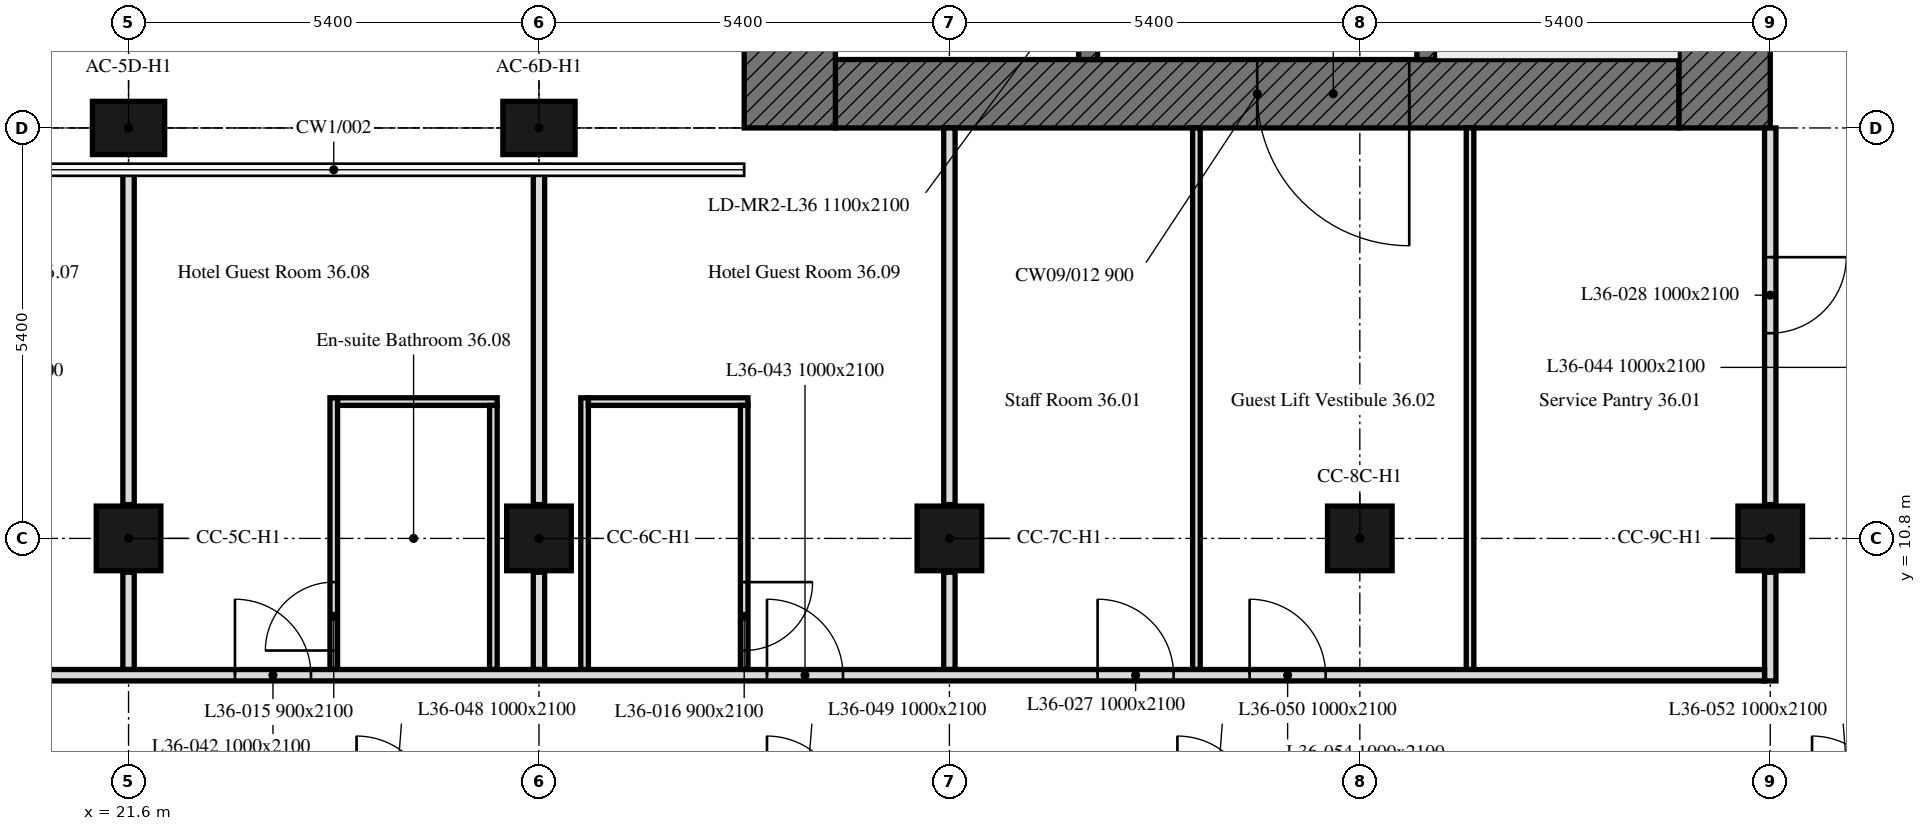
"""IFC4 building model, lengths in metres.
Left out: names, types, materials, properties, quantities, classifications, styles, units other than length and angle.
Written with IfcOpenShell. Run it as: python <this file> out.ifc"""

import sys

from ifc_helpers import new_model, si_unit, direction, frame, frame_2d, origin, origin_2d, place, context, subcontext, project, spatial, rectangle, extrude, element, fill, save


model = new_model("IFC4")
c1 = context("Model", 3, precision=1e-05, world=origin(), true_north=direction((0.0, 1.0)))
c2 = subcontext(c1, "Body", "Model", "MODEL_VIEW")
j1 = project(units=[si_unit("LENGTHUNIT", "METRE"), si_unit("PLANEANGLEUNIT", "RADIAN")], contexts=[c1])
p1 = place(None, origin())
s1 = spatial("IfcSite", under=j1, at=p1, CompositionType="ELEMENT")
p2 = place(p1, origin())
s2 = spatial("IfcBuilding", under=s1, at=p2, CompositionType="ELEMENT")
p3 = place(p2, frame((0.0, 0.0, 156.1)))
s3 = spatial("IfcBuildingStorey", under=s2, at=p3, CompositionType="ELEMENT", Elevation=156.1)
for number, where, z_axis, x_axis in (
    (1, (21.6, 10.8, 0.0), (0.0, 0.0, 1.0), (1.0, 0.0, 0.0)),
    (2, (27.0, 10.8, 0.0), (0.0, 0.0, 1.0), (1.0, 0.0, 0.0)),
    (3, (32.4, 10.8, 0.0), (0.0, 0.0, 1.0), (1.0, 0.0, 0.0)),
    (4, (37.8, 10.8, 0.0), (0.0, 0.0, 1.0), (1.0, 0.0, 0.0)),
    (5, (43.2, 10.8, 0.0), (0.0, 0.0, 1.0), (1.0, 0.0, 0.0)),
):
    element("IfcColumn", number, at=place(p3, frame(where, z_axis=z_axis, x_axis=x_axis)), inside=s3, PredefinedType="COLUMN", context=c2, shape_type="SweptSolid", body=[
        extrude(rectangle(XDim=0.85, YDim=0.85, at=origin_2d()), origin(), (0.0, 0.0, 1.0), 3.0),
    ])
for number, where, z_axis, x_axis in (
    (6, (21.6, 16.2, 0.0), (0.0, 0.0, 1.0), (1.0, 0.0, 0.0)),
    (7, (27.0, 16.2, 0.0), (0.0, 0.0, 1.0), (1.0, 0.0, 0.0)),
):
    element("IfcColumn", number, at=place(p3, frame(where, z_axis=z_axis, x_axis=x_axis)), inside=s3, PredefinedType="COLUMN", context=c2, shape_type="SweptSolid", body=[
        extrude(rectangle(XDim=0.95, YDim=0.7, at=origin_2d()), origin(), (0.0, 0.0, 1.0), 3.0),
    ])
p4 = place(p3, frame((42.0, 16.65, 0.0), z_axis=(0.0, 0.0, 1.0), x_axis=(-1.0, 0.0, 0.0)))
e8 = element("IfcWall", 8, at=p4, inside=s3, PredefinedType="SOLIDWALL", context=c2, shape_type="SweptSolid", body=[
    extrude(rectangle(XDim=11.1, YDim=0.9, at=frame_2d((5.55, 0.0))), origin(), (0.0, 0.0, 1.0), 3.0),
])
p5 = place(p4, frame((3.55, 0.0, 0.0)))
e9 = element("IfcOpeningElement", 9, at=p5, cuts=e8, PredefinedType="OPENING", context=c2, shape_type="SweptSolid", body=[
    extrude(rectangle(XDim=2.0, YDim=2.4, at=frame_2d((1.0, 1.2))), frame((0.0, 0.45, 0.0), z_axis=(0.0, -1.0, 0.0), x_axis=(1.0, 0.0, 0.0)), (0.0, 0.0, 1.0), 0.9),
])
for number, where, z_axis, x_axis in (
    (10, (42.6, 32.4, 0.0), (0.0, 0.0, 1.0), (0.0, -1.0, 0.0)),
    (11, (30.3, 16.2, 0.0), (0.0, 0.0, 1.0), (0.0, 1.0, 0.0)),
):
    element("IfcWall", number, at=place(p3, frame(where, z_axis=z_axis, x_axis=x_axis)), inside=s3, PredefinedType="SOLIDWALL", context=c2, shape_type="SweptSolid", body=[
        extrude(rectangle(XDim=16.2, YDim=1.2, at=frame_2d((8.1, 0.0))), origin(), (0.0, 0.0, 1.0), 3.0),
    ])
p6 = place(p3, frame((38.675, 17.1, 0.0), z_axis=(0.0, 0.0, 1.0), x_axis=(0.0, 1.0, 0.0)))
e12 = element("IfcWall", 12, at=p6, inside=s3, PredefinedType="SOLIDWALL", context=c2, shape_type="SweptSolid", body=[
    extrude(rectangle(XDim=14.4, YDim=0.25, at=frame_2d((7.2, 0.0))), origin(), (0.0, 0.0, 1.0), 3.0),
])
p7 = place(p6, frame((4.6, 0.0, 0.0)))
e13 = element("IfcOpeningElement", 13, at=p7, cuts=e12, PredefinedType="OPENING", context=c2, shape_type="SweptSolid", body=[
    extrude(rectangle(XDim=1.0, YDim=2.1, at=frame_2d((0.5, 1.05))), frame((0.0, 0.125, 0.0), z_axis=(0.0, -1.0, 0.0), x_axis=(1.0, 0.0, 0.0)), (0.0, 0.0, 1.0), 0.25),
])
p8 = place(p6, frame((7.062, 0.0, 0.0)))
e14 = element("IfcOpeningElement", 14, at=p8, cuts=e12, PredefinedType="OPENING", context=c2, shape_type="SweptSolid", body=[
    extrude(rectangle(XDim=1.2, YDim=2.1, at=frame_2d((0.6, 1.05))), frame((0.0, 0.125, 0.0), z_axis=(0.0, -1.0, 0.0), x_axis=(1.0, 0.0, 0.0)), (0.0, 0.0, 1.0), 0.25),
])
p9 = place(p6, frame((9.599, 0.0, 0.0)))
e15 = element("IfcOpeningElement", 15, at=p9, cuts=e12, PredefinedType="OPENING", context=c2, shape_type="SweptSolid", body=[
    extrude(rectangle(XDim=0.9, YDim=2.1, at=frame_2d((0.45, 1.05))), frame((0.0, 0.125, 0.0), z_axis=(0.0, -1.0, 0.0), x_axis=(1.0, 0.0, 0.0)), (0.0, 0.0, 1.0), 0.25),
])
p10 = place(p6, frame((11.032, 0.0, 0.0)))
e16 = element("IfcOpeningElement", 16, at=p10, cuts=e12, PredefinedType="OPENING", context=c2, shape_type="SweptSolid", body=[
    extrude(rectangle(XDim=0.9, YDim=2.1, at=frame_2d((0.45, 1.05))), frame((0.0, 0.125, 0.0), z_axis=(0.0, -1.0, 0.0), x_axis=(1.0, 0.0, 0.0)), (0.0, 0.0, 1.0), 0.25),
])
p11 = place(p6, frame((12.846, 0.0, 0.0)))
e17 = element("IfcOpeningElement", 17, at=p11, cuts=e12, PredefinedType="OPENING", context=c2, shape_type="SweptSolid", body=[
    extrude(rectangle(XDim=0.9, YDim=2.1, at=frame_2d((0.45, 1.05))), frame((0.0, 0.125, 0.0), z_axis=(0.0, -1.0, 0.0), x_axis=(1.0, 0.0, 0.0)), (0.0, 0.0, 1.0), 0.25),
])
p12 = place(p3, frame((34.225, 17.1, 0.0), z_axis=(0.0, 0.0, 1.0), x_axis=(0.0, 1.0, 0.0)))
e18 = element("IfcWall", 18, at=p12, inside=s3, PredefinedType="SOLIDWALL", context=c2, shape_type="SweptSolid", body=[
    extrude(rectangle(XDim=14.4, YDim=0.25, at=frame_2d((7.2, 0.0))), origin(), (0.0, 0.0, 1.0), 3.0),
])
p13 = place(p12, frame((13.15, 0.0, 0.0)))
e19 = element("IfcOpeningElement", 19, at=p13, cuts=e18, PredefinedType="OPENING", context=c2, shape_type="SweptSolid", body=[
    extrude(rectangle(XDim=1.0, YDim=2.1, at=frame_2d((0.5, 1.05))), frame((0.0, 0.125, 0.0), z_axis=(0.0, -1.0, 0.0), x_axis=(1.0, 0.0, 0.0)), (0.0, 0.0, 1.0), 0.25),
])
p14 = place(p12, frame((0.6, 0.0, 0.0)))
e20 = element("IfcOpeningElement", 20, at=p14, cuts=e18, PredefinedType="OPENING", context=c2, shape_type="SweptSolid", body=[
    extrude(rectangle(XDim=1.1, YDim=2.1, at=frame_2d((0.55, 1.05))), frame((0.0, 0.125, 0.0), z_axis=(0.0, -1.0, 0.0), x_axis=(1.0, 0.0, 0.0)), (0.0, 0.0, 1.0), 0.25),
])
p15 = place(p12, frame((3.25, 0.0, 0.0)))
e21 = element("IfcOpeningElement", 21, at=p15, cuts=e18, PredefinedType="OPENING", context=c2, shape_type="SweptSolid", body=[
    extrude(rectangle(XDim=0.9, YDim=2.1, at=frame_2d((0.45, 1.05))), frame((0.0, 0.125, 0.0), z_axis=(0.0, -1.0, 0.0), x_axis=(1.0, 0.0, 0.0)), (0.0, 0.0, 1.0), 0.25),
])
p16 = place(p3, frame((21.6, 9.075, 0.0), z_axis=(0.0, 0.0, 1.0), x_axis=(0.0, 1.0, 0.0)))
e22 = element("IfcWall", 22, at=p16, inside=s3, PredefinedType="PARTITIONING", context=c2, shape_type="SweptSolid", body=[
    extrude(rectangle(XDim=1.28, YDim=0.15, at=frame_2d((0.64, 0.0))), origin(), (0.0, 0.0, 1.0), 2.4),
])
p17 = place(p3, frame((21.6, 11.245, 0.0), z_axis=(0.0, 0.0, 1.0), x_axis=(0.0, 1.0, 0.0)))
e23 = element("IfcWall", 23, at=p17, inside=s3, PredefinedType="PARTITIONING", context=c2, shape_type="SweptSolid", body=[
    extrude(rectangle(XDim=4.46, YDim=0.15, at=frame_2d((2.23, 0.0))), origin(), (0.0, 0.0, 1.0), 2.4),
])
p18 = place(p3, frame((24.3, 9.075, 0.0), z_axis=(0.0, 0.0, 1.0), x_axis=(0.0, 1.0, 0.0)))
e24 = element("IfcWall", 24, at=p18, inside=s3, PredefinedType="PARTITIONING", context=c2, shape_type="SweptSolid", body=[
    extrude(rectangle(XDim=3.575, YDim=0.1, at=frame_2d((1.788, 0.0))), origin(), (0.0, 0.0, 1.0), 3.0),
])
p19 = place(p18, frame((0.25, 0.0, 0.0)))
e25 = element("IfcOpeningElement", 25, at=p19, cuts=e24, PredefinedType="OPENING", context=c2, shape_type="SweptSolid", body=[
    extrude(rectangle(XDim=0.9, YDim=2.1, at=frame_2d((0.45, 1.05))), frame((0.0, 0.05, 0.0), z_axis=(0.0, -1.0, 0.0), x_axis=(1.0, 0.0, 0.0)), (0.0, 0.0, 1.0), 0.1),
])
p20 = place(p3, frame((24.35, 12.6, 0.0), z_axis=(0.0, 0.0, 1.0), x_axis=(1.0, 0.0, 0.0)))
e26 = element("IfcWall", 26, at=p20, inside=s3, PredefinedType="PARTITIONING", context=c2, shape_type="SweptSolid", body=[
    extrude(rectangle(XDim=2.1, YDim=0.1, at=frame_2d((1.05, 0.0))), origin(), (0.0, 0.0, 1.0), 3.0),
])
p21 = place(p3, frame((26.4, 12.55, 0.0), z_axis=(0.0, 0.0, 1.0), x_axis=(0.0, -1.0, 0.0)))
e27 = element("IfcWall", 27, at=p21, inside=s3, PredefinedType="PARTITIONING", context=c2, shape_type="SweptSolid", body=[
    extrude(rectangle(XDim=3.475, YDim=0.1, at=frame_2d((1.738, 0.0))), origin(), (0.0, 0.0, 1.0), 3.0),
])
p22 = place(p3, frame((27.0, 9.075, 0.0), z_axis=(0.0, 0.0, 1.0), x_axis=(0.0, 1.0, 0.0)))
e28 = element("IfcWall", 28, at=p22, inside=s3, PredefinedType="PARTITIONING", context=c2, shape_type="SweptSolid", body=[
    extrude(rectangle(XDim=1.28, YDim=0.15, at=frame_2d((0.64, 0.0))), origin(), (0.0, 0.0, 1.0), 2.4),
])
p23 = place(p3, frame((27.0, 11.245, 0.0), z_axis=(0.0, 0.0, 1.0), x_axis=(0.0, 1.0, 0.0)))
e29 = element("IfcWall", 29, at=p23, inside=s3, PredefinedType="PARTITIONING", context=c2, shape_type="SweptSolid", body=[
    extrude(rectangle(XDim=4.46, YDim=0.15, at=frame_2d((2.23, 0.0))), origin(), (0.0, 0.0, 1.0), 2.4),
])
p24 = place(p3, frame((27.6, 9.075, 0.0), z_axis=(0.0, 0.0, 1.0), x_axis=(0.0, 1.0, 0.0)))
e30 = element("IfcWall", 30, at=p24, inside=s3, PredefinedType="PARTITIONING", context=c2, shape_type="SweptSolid", body=[
    extrude(rectangle(XDim=3.575, YDim=0.1, at=frame_2d((1.788, 0.0))), origin(), (0.0, 0.0, 1.0), 3.0),
])
p25 = place(p3, frame((27.65, 12.6, 0.0), z_axis=(0.0, 0.0, 1.0), x_axis=(1.0, 0.0, 0.0)))
e31 = element("IfcWall", 31, at=p25, inside=s3, PredefinedType="PARTITIONING", context=c2, shape_type="SweptSolid", body=[
    extrude(rectangle(XDim=2.1, YDim=0.1, at=frame_2d((1.05, 0.0))), origin(), (0.0, 0.0, 1.0), 3.0),
])
p26 = place(p3, frame((29.7, 12.55, 0.0), z_axis=(0.0, 0.0, 1.0), x_axis=(0.0, -1.0, 0.0)))
e32 = element("IfcWall", 32, at=p26, inside=s3, PredefinedType="PARTITIONING", context=c2, shape_type="SweptSolid", body=[
    extrude(rectangle(XDim=3.475, YDim=0.1, at=frame_2d((1.738, 0.0))), origin(), (0.0, 0.0, 1.0), 3.0),
])
p27 = place(p26, frame((2.325, 0.0, 0.0)))
e33 = element("IfcOpeningElement", 33, at=p27, cuts=e32, PredefinedType="OPENING", context=c2, shape_type="SweptSolid", body=[
    extrude(rectangle(XDim=0.9, YDim=2.1, at=frame_2d((0.45, 1.05))), frame((0.0, 0.05, 0.0), z_axis=(0.0, -1.0, 0.0), x_axis=(1.0, 0.0, 0.0)), (0.0, 0.0, 1.0), 0.1),
])
p28 = place(p3, frame((32.4, 9.075, 0.0), z_axis=(0.0, 0.0, 1.0), x_axis=(0.0, 1.0, 0.0)))
e34 = element("IfcWall", 34, at=p28, inside=s3, PredefinedType="PARTITIONING", context=c2, shape_type="SweptSolid", body=[
    extrude(rectangle(XDim=1.28, YDim=0.15, at=frame_2d((0.64, 0.0))), origin(), (0.0, 0.0, 1.0), 2.4),
])
p29 = place(p3, frame((32.4, 11.245, 0.0), z_axis=(0.0, 0.0, 1.0), x_axis=(0.0, 1.0, 0.0)))
e35 = element("IfcWall", 35, at=p29, inside=s3, PredefinedType="PARTITIONING", context=c2, shape_type="SweptSolid", body=[
    extrude(rectangle(XDim=4.955, YDim=0.15, at=frame_2d((2.478, 0.0))), origin(), (0.0, 0.0, 1.0), 2.4),
])
for number, where, z_axis, x_axis in (
    (36, (35.65, 16.2, 0.0), (0.0, 0.0, 1.0), (0.0, -1.0, 0.0)),
    (37, (39.25, 9.075, 0.0), (0.0, 0.0, 1.0), (0.0, 1.0, 0.0)),
):
    element("IfcWall", number, at=place(p3, frame(where, z_axis=z_axis, x_axis=x_axis)), inside=s3, PredefinedType="PARTITIONING", context=c2, shape_type="SweptSolid", body=[
        extrude(rectangle(XDim=7.125, YDim=0.1, at=frame_2d((3.562, 0.0))), origin(), (0.0, 0.0, 1.0), 2.4),
    ])
p30 = place(p3, frame((43.2, 16.2, 0.0), z_axis=(0.0, 0.0, 1.0), x_axis=(0.0, -1.0, 0.0)))
e38 = element("IfcWall", 38, at=p30, inside=s3, PredefinedType="PARTITIONING", context=c2, shape_type="SweptSolid", body=[
    extrude(rectangle(XDim=4.955, YDim=0.15, at=frame_2d((2.478, 0.0))), origin(), (0.0, 0.0, 1.0), 3.0),
])
p31 = place(p30, frame((1.7, 0.0, 0.0)))
e39 = element("IfcOpeningElement", 39, at=p31, cuts=e38, PredefinedType="OPENING", context=c2, shape_type="SweptSolid", body=[
    extrude(rectangle(XDim=1.0, YDim=2.1, at=frame_2d((0.5, 1.05))), frame((0.0, 0.075, 0.0), z_axis=(0.0, -1.0, 0.0), x_axis=(1.0, 0.0, 0.0)), (0.0, 0.0, 1.0), 0.15),
])
p32 = place(p3, frame((43.2, 10.355, 0.0), z_axis=(0.0, 0.0, 1.0), x_axis=(0.0, -1.0, 0.0)))
e40 = element("IfcWall", 40, at=p32, inside=s3, PredefinedType="PARTITIONING", context=c2, shape_type="SweptSolid", body=[
    extrude(rectangle(XDim=1.43, YDim=0.15, at=frame_2d((0.715, 0.0))), origin(), (0.0, 0.0, 1.0), 3.0),
])
p33 = place(p3, frame((6.151, 9.0, 0.0), z_axis=(0.0, 0.0, 1.0), x_axis=(1.0, 0.0, 0.0)))
e41 = element("IfcWall", 41, at=p33, inside=s3, PredefinedType="PARTITIONING", context=c2, shape_type="SweptSolid", body=[
    extrude(rectangle(XDim=36.974, YDim=0.15, at=frame_2d((18.487, 0.0))), origin(), (0.0, 0.0, 1.0), 2.4),
])
p34 = place(p33, frame((1.214, 0.0, 0.0)))
e42 = element("IfcOpeningElement", 42, at=p34, cuts=e41, PredefinedType="OPENING", context=c2, shape_type="SweptSolid", body=[
    extrude(rectangle(XDim=1.0, YDim=2.1, at=frame_2d((0.5, 1.05))), frame((0.0, 0.075, 0.0), z_axis=(0.0, -1.0, 0.0), x_axis=(1.0, 0.0, 0.0)), (0.0, 0.0, 1.0), 0.15),
])
p35 = place(p33, frame((28.199, 0.0, 0.0)))
e43 = element("IfcOpeningElement", 43, at=p35, cuts=e41, PredefinedType="OPENING", context=c2, shape_type="SweptSolid", body=[
    extrude(rectangle(XDim=1.0, YDim=2.1, at=frame_2d((0.5, 1.05))), frame((0.0, 0.075, 0.0), z_axis=(0.0, -1.0, 0.0), x_axis=(1.0, 0.0, 0.0)), (0.0, 0.0, 1.0), 0.15),
])
p36 = place(p33, frame((7.099, 0.0, 0.0)))
e44 = element("IfcOpeningElement", 44, at=p36, cuts=e41, PredefinedType="OPENING", context=c2, shape_type="SweptSolid", body=[
    extrude(rectangle(XDim=1.0, YDim=2.1, at=frame_2d((0.5, 1.05))), frame((0.0, 0.075, 0.0), z_axis=(0.0, -1.0, 0.0), x_axis=(1.0, 0.0, 0.0)), (0.0, 0.0, 1.0), 0.15),
])
p37 = place(p33, frame((13.049, 0.0, 0.0)))
e45 = element("IfcOpeningElement", 45, at=p37, cuts=e41, PredefinedType="OPENING", context=c2, shape_type="SweptSolid", body=[
    extrude(rectangle(XDim=1.0, YDim=2.1, at=frame_2d((0.5, 1.05))), frame((0.0, 0.075, 0.0), z_axis=(0.0, -1.0, 0.0), x_axis=(1.0, 0.0, 0.0)), (0.0, 0.0, 1.0), 0.15),
])
p38 = place(p33, frame((16.849, 0.0, 0.0)))
e46 = element("IfcOpeningElement", 46, at=p38, cuts=e41, PredefinedType="OPENING", context=c2, shape_type="SweptSolid", body=[
    extrude(rectangle(XDim=1.0, YDim=2.1, at=frame_2d((0.5, 1.05))), frame((0.0, 0.075, 0.0), z_axis=(0.0, -1.0, 0.0), x_axis=(1.0, 0.0, 0.0)), (0.0, 0.0, 1.0), 0.15),
])
p39 = place(p33, frame((23.849, 0.0, 0.0)))
e47 = element("IfcOpeningElement", 47, at=p39, cuts=e41, PredefinedType="OPENING", context=c2, shape_type="SweptSolid", body=[
    extrude(rectangle(XDim=1.0, YDim=2.1, at=frame_2d((0.5, 1.05))), frame((0.0, 0.075, 0.0), z_axis=(0.0, -1.0, 0.0), x_axis=(1.0, 0.0, 0.0)), (0.0, 0.0, 1.0), 0.15),
])
p40 = place(p33, frame((4.829, 0.0, 0.0)))
e48 = element("IfcOpeningElement", 48, at=p40, cuts=e41, PredefinedType="OPENING", context=c2, shape_type="SweptSolid", body=[
    extrude(rectangle(XDim=1.8, YDim=2.4, at=frame_2d((0.9, 1.2))), frame((0.0, 0.075, 0.0), z_axis=(0.0, -1.0, 0.0), x_axis=(1.0, 0.0, 0.0)), (0.0, 0.0, 1.0), 0.15),
])
p41 = place(p33, frame((30.199, 0.0, 0.0)))
e49 = element("IfcOpeningElement", 49, at=p41, cuts=e41, PredefinedType="OPENING", context=c2, shape_type="SweptSolid", body=[
    extrude(rectangle(XDim=1.0, YDim=2.1, at=frame_2d((0.5, 1.05))), frame((0.0, 0.075, 0.0), z_axis=(0.0, -1.0, 0.0), x_axis=(1.0, 0.0, 0.0)), (0.0, 0.0, 1.0), 0.15),
])
p42 = place(p5, origin())
e50 = element("IfcDoor", 50, at=p42, inside=s3, OperationType="DOUBLE_DOOR_SINGLE_SWING", PredefinedType="DOOR", context=c2, shape_type="SweptSolid", body=[
    extrude(rectangle(XDim=2.0, YDim=2.4, at=frame_2d((1.0, 1.2))), frame((0.0, 0.025, 0.0), z_axis=(0.0, -1.0, 0.0), x_axis=(1.0, 0.0, 0.0)), (0.0, 0.0, 1.0), 0.05),
])
fill(e9, e50)
p43 = place(p19, origin())
e51 = element("IfcDoor", 51, at=p43, inside=s3, OperationType="SINGLE_SWING_RIGHT", PredefinedType="DOOR", context=c2, shape_type="SweptSolid", body=[
    extrude(rectangle(XDim=0.9, YDim=2.1, at=frame_2d((0.45, 1.05))), frame((0.0, 0.025, 0.0), z_axis=(0.0, -1.0, 0.0), x_axis=(1.0, 0.0, 0.0)), (0.0, 0.0, 1.0), 0.05),
])
fill(e25, e51)
p44 = place(p27, origin())
e52 = element("IfcDoor", 52, at=p44, inside=s3, OperationType="SINGLE_SWING_LEFT", PredefinedType="DOOR", context=c2, shape_type="SweptSolid", body=[
    extrude(rectangle(XDim=0.9, YDim=2.1, at=frame_2d((0.45, 1.05))), frame((0.0, 0.025, 0.0), z_axis=(0.0, -1.0, 0.0), x_axis=(1.0, 0.0, 0.0)), (0.0, 0.0, 1.0), 0.05),
])
fill(e33, e52)
p45 = place(p35, origin())
e53 = element("IfcDoor", 53, at=p45, inside=s3, OperationType="SINGLE_SWING_RIGHT", PredefinedType="DOOR", context=c2, shape_type="SweptSolid", body=[
    extrude(rectangle(XDim=1.0, YDim=2.1, at=frame_2d((0.5, 1.05))), frame((0.0, 0.025, 0.0), z_axis=(0.0, -1.0, 0.0), x_axis=(1.0, 0.0, 0.0)), (0.0, 0.0, 1.0), 0.05),
])
fill(e43, e53)
p46 = place(p31, origin())
e54 = element("IfcDoor", 54, at=p46, inside=s3, OperationType="SINGLE_SWING_LEFT", PredefinedType="DOOR", context=c2, shape_type="SweptSolid", body=[
    extrude(rectangle(XDim=1.0, YDim=2.1, at=frame_2d((0.5, 1.05))), frame((0.0, 0.025, 0.0), z_axis=(0.0, -1.0, 0.0), x_axis=(1.0, 0.0, 0.0)), (0.0, 0.0, 1.0), 0.05),
])
fill(e39, e54)
p47 = place(p38, origin())
e55 = element("IfcDoor", 55, at=p47, inside=s3, OperationType="SINGLE_SWING_LEFT", PredefinedType="DOOR", context=c2, shape_type="SweptSolid", body=[
    extrude(rectangle(XDim=1.0, YDim=2.1, at=frame_2d((0.5, 1.05))), frame((0.0, 0.025, 0.0), z_axis=(0.0, -1.0, 0.0), x_axis=(1.0, 0.0, 0.0)), (0.0, 0.0, 1.0), 0.05),
])
fill(e46, e55)
p48 = place(p39, origin())
e56 = element("IfcDoor", 56, at=p48, inside=s3, OperationType="SINGLE_SWING_RIGHT", PredefinedType="DOOR", context=c2, shape_type="SweptSolid", body=[
    extrude(rectangle(XDim=1.0, YDim=2.1, at=frame_2d((0.5, 1.05))), frame((0.0, 0.025, 0.0), z_axis=(0.0, -1.0, 0.0), x_axis=(1.0, 0.0, 0.0)), (0.0, 0.0, 1.0), 0.05),
])
fill(e47, e56)
p49 = place(p41, origin())
e57 = element("IfcDoor", 57, at=p49, inside=s3, OperationType="SINGLE_SWING_RIGHT", PredefinedType="DOOR", context=c2, shape_type="SweptSolid", body=[
    extrude(rectangle(XDim=1.0, YDim=2.1, at=frame_2d((0.5, 1.05))), frame((0.0, 0.025, 0.0), z_axis=(0.0, -1.0, 0.0), x_axis=(1.0, 0.0, 0.0)), (0.0, 0.0, 1.0), 0.05),
])
fill(e49, e57)
save(model, sys.argv[1])
